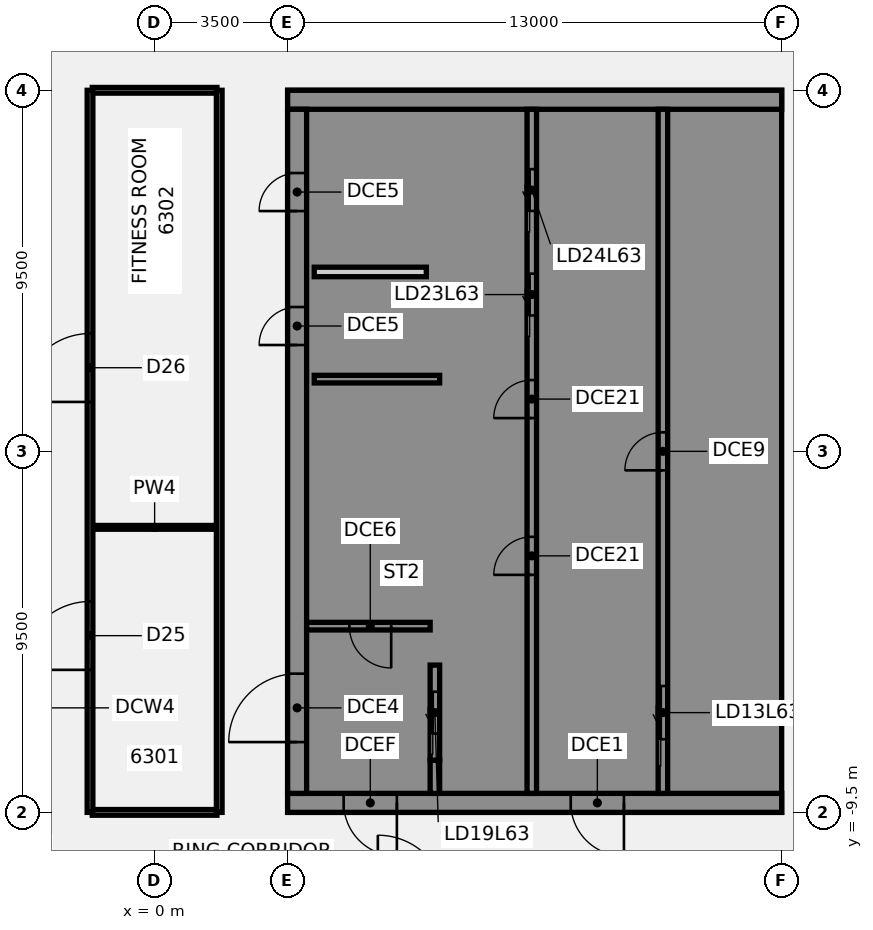
"""IFC4 building model, lengths in metres.
Left out: names, types, materials, properties, quantities, classifications, styles, units other than length and angle.
Written with IfcOpenShell. Run it as: python <this file> out.ifc"""

import sys

from ifc_helpers import new_model, si_unit, direction, frame, frame_2d, origin, place, context, subcontext, project, spatial, polyline, rectangle, outline, extrude, element, fill, save


model = new_model("IFC4")
c1 = context("Model", 3, precision=1e-05, world=origin(), true_north=direction((0.0, 1.0)))
c2 = subcontext(c1, "Body", "Model", "MODEL_VIEW")
j1 = project(units=[si_unit("LENGTHUNIT", "METRE"), si_unit("PLANEANGLEUNIT", "RADIAN")], contexts=[c1])
p1 = place(None, origin())
s1 = spatial("IfcSite", under=j1, at=p1, CompositionType="ELEMENT")
p2 = place(p1, origin())
s2 = spatial("IfcBuilding", under=s1, at=p2, CompositionType="ELEMENT")
p3 = place(p2, frame((0.0, 0.0, 248.7)))
s3 = spatial("IfcBuildingStorey", under=s2, at=p3, CompositionType="ELEMENT", Elevation=248.7)
p4 = place(p3, frame((-1.64, -9.5, 0.0), z_axis=(0.0, 0.0, 1.0), x_axis=(1.0, 0.0, 0.0)))
e1 = element("IfcWall", 1, at=p4, inside=s3, PredefinedType="PARTITIONING", context=c2, shape_type="SweptSolid", body=[
    extrude(rectangle(XDim=3.28, YDim=0.15, at=frame_2d((1.64, 0.0))), origin(), (0.0, 0.0, 1.0), 2.824),
])
p5 = place(p3, frame((-1.64, -2.0, 0.0), z_axis=(0.0, 0.0, 1.0), x_axis=(1.0, 0.0, 0.0)))
e2 = element("IfcWall", 2, at=p5, inside=s3, PredefinedType="PARTITIONING", context=c2, shape_type="SweptSolid", body=[
    extrude(rectangle(XDim=3.28, YDim=0.1, at=frame_2d((1.64, 0.0))), origin(), (0.0, 0.0, 1.0), 2.824),
])
p6 = place(p3, frame((-1.64, 9.5, 0.0), z_axis=(0.0, 0.0, 1.0), x_axis=(1.0, 0.0, 0.0)))
e3 = element("IfcWall", 3, at=p6, inside=s3, PredefinedType="PARTITIONING", context=c2, shape_type="SweptSolid", body=[
    extrude(rectangle(XDim=3.28, YDim=0.15, at=frame_2d((1.64, 0.0))), origin(), (0.0, 0.0, 1.0), 2.824),
])
p7 = place(p3, frame((-1.7, -9.5, 0.0), z_axis=(0.0, 0.0, 1.0), x_axis=(0.0, 1.0, 0.0)))
e4 = element("IfcWall", 4, at=p7, inside=s3, PredefinedType="PARTITIONING", context=c2, shape_type="SweptSolid", body=[
    extrude(rectangle(XDim=19.0, YDim=0.15, at=frame_2d((9.5, 0.0))), origin(), (0.0, 0.0, 1.0), 2.824),
])
p8 = place(p7, frame((3.75, 0.0, 0.0)))
e5 = element("IfcOpeningElement", 5, at=p8, cuts=e4, PredefinedType="OPENING", context=c2, shape_type="SweptSolid", body=[
    extrude(rectangle(XDim=1.8, YDim=2.1, at=frame_2d((0.9, 1.05))), frame((0.0, 0.085, 0.0), z_axis=(0.0, -1.0, 0.0), x_axis=(1.0, 0.0, 0.0)), (0.0, 0.0, 1.0), 0.17),
])
p9 = place(p7, frame((10.8, 0.0, 0.0)))
e6 = element("IfcOpeningElement", 6, at=p9, cuts=e4, PredefinedType="OPENING", context=c2, shape_type="SweptSolid", body=[
    extrude(rectangle(XDim=1.8, YDim=2.1, at=frame_2d((0.9, 1.05))), frame((0.0, 0.085, 0.0), z_axis=(0.0, -1.0, 0.0), x_axis=(1.0, 0.0, 0.0)), (0.0, 0.0, 1.0), 0.17),
])
p10 = place(p3, frame((1.7, -9.5, 0.0), z_axis=(0.0, 0.0, 1.0), x_axis=(0.0, 1.0, 0.0)))
e7 = element("IfcWall", 7, at=p10, inside=s3, PredefinedType="PARTITIONING", context=c2, shape_type="SweptSolid", body=[
    extrude(rectangle(XDim=19.0, YDim=0.15, at=frame_2d((9.5, 0.0))), origin(), (0.0, 0.0, 1.0), 2.824),
])
p11 = place(p3, frame((16.5, -9.25, 0.0), z_axis=(0.0, 0.0, 1.0), x_axis=(-1.0, 0.0, 0.0)))
e8 = element("IfcWall", 8, at=p11, inside=s3, PredefinedType="SHEAR", context=c2, shape_type="SweptSolid", body=[
    extrude(rectangle(XDim=13.0, YDim=0.5, at=frame_2d((6.5, 0.0))), origin(), (0.0, 0.0, 1.0), 3.42),
])
p12 = place(p11, frame((4.15, 0.0, 0.0)))
e9 = element("IfcOpeningElement", 9, at=p12, cuts=e8, PredefinedType="OPENING", context=c2, shape_type="SweptSolid", body=[
    extrude(rectangle(XDim=1.4, YDim=2.1, at=frame_2d((0.7, 1.05))), frame((0.0, 0.26, 0.0), z_axis=(0.0, -1.0, 0.0), x_axis=(1.0, 0.0, 0.0)), (0.0, 0.0, 1.0), 0.52),
])
p13 = place(p11, frame((10.125, 0.0, 0.0)))
e10 = element("IfcOpeningElement", 10, at=p13, cuts=e8, PredefinedType="OPENING", context=c2, shape_type="SweptSolid", body=[
    extrude(rectangle(XDim=1.4, YDim=2.1, at=frame_2d((0.7, 1.05))), frame((0.0, 0.26, 0.0), z_axis=(0.0, -1.0, 0.0), x_axis=(1.0, 0.0, 0.0)), (0.0, 0.0, 1.0), 0.52),
])
p14 = place(p3, origin())
e11 = element("IfcWall", 11, at=p14, inside=s3, PredefinedType="SHEAR", context=c2, shape_type="SweptSolid", body=[
    extrude(outline(polyline([(13.5, -8.125), (13.5, -9.0), (16.0, -9.0), (16.5, -9.0), (16.5, 9.0), (16.0, 9.0), (13.5, 9.0), (13.5, 8.125), (16.0, 8.125), (16.0, 5.625), (13.5, 5.625), (13.5, 5.375), (16.0, 5.375), (16.0, -5.375), (13.5, -5.375), (13.5, -5.625), (16.0, -5.625), (16.0, -8.125), (13.5, -8.125)])), origin(), (0.0, 0.0, 1.0), 3.42),
])
p15 = place(p3, frame((16.5, 9.25, 0.0), z_axis=(0.0, 0.0, 1.0), x_axis=(-1.0, 0.0, 0.0)))
e12 = element("IfcWall", 12, at=p15, inside=s3, PredefinedType="SHEAR", context=c2, shape_type="SweptSolid", body=[
    extrude(rectangle(XDim=13.0, YDim=0.5, at=frame_2d((6.5, 0.0))), origin(), (0.0, 0.0, 1.0), 3.42),
])
p16 = place(p3, origin())
e13 = element("IfcWall", 13, at=p16, inside=s3, PredefinedType="SHEAR", context=c2, shape_type="SweptSolid", body=[
    extrude(outline(polyline([(9.8, -5.375), (7.5, -5.375), (7.5, 2.625), (9.8, 2.625), (9.8, 2.875), (7.5, 2.875), (7.5, 5.375), (9.8, 5.375), (9.8, 5.625), (7.5, 5.625), (7.5, 8.125), (9.8, 8.125), (9.8, 9.0), (7.5, 9.0), (7.25, 9.0), (7.25, -5.625), (7.5, -5.625), (9.8, -5.625), (9.8, -5.375)])), origin(), (0.0, 0.0, 1.0), 3.42),
])
p17 = place(p3, origin())
e14 = element("IfcWall", 14, at=p17, inside=s3, PredefinedType="SHEAR", context=c2, shape_type="SweptSolid", body=[
    extrude(outline(polyline([(7.5, -8.125), (7.5, -9.0), (9.8, -9.0), (9.8, -8.125), (9.8, -5.625), (9.55, -5.625), (9.55, -8.125), (7.5, -8.125)])), origin(), (0.0, 0.0, 1.0), 3.42),
])
p18 = place(p3, frame((7.375, -9.0, 0.0), z_axis=(0.0, 0.0, 1.0), x_axis=(0.0, 1.0, 0.0)))
e15 = element("IfcWall", 15, at=p18, inside=s3, PredefinedType="SHEAR", context=c2, shape_type="SweptSolid", body=[
    extrude(rectangle(XDim=0.875, YDim=0.25, at=frame_2d((0.438, 0.0))), origin(), (0.0, 0.0, 1.0), 3.42),
])
p19 = place(p3, frame((7.5, 1.9, 0.0), z_axis=(0.0, 0.0, 1.0), x_axis=(-1.0, 0.0, 0.0)))
e16 = element("IfcWall", 16, at=p19, inside=s3, PredefinedType="SHEAR", context=c2, shape_type="SweptSolid", body=[
    extrude(rectangle(XDim=3.3, YDim=0.2, at=frame_2d((1.65, 0.0))), origin(), (0.0, 0.0, 1.0), 3.42),
])
p20 = place(p3, frame((13.375, -9.0, 0.0), z_axis=(0.0, 0.0, 1.0), x_axis=(0.0, 1.0, 0.0)))
e17 = element("IfcWall", 17, at=p20, inside=s3, PredefinedType="SHEAR", context=c2, shape_type="SweptSolid", body=[
    extrude(rectangle(XDim=18.0, YDim=0.25, at=frame_2d((9.0, 0.0))), origin(), (0.0, 0.0, 1.0), 3.42),
])
p21 = place(p20, frame((1.425, 0.0, 0.0)))
e18 = element("IfcOpeningElement", 18, at=p21, cuts=e17, PredefinedType="OPENING", context=c2, shape_type="SweptSolid", body=[
    extrude(rectangle(XDim=1.4, YDim=2.1, at=frame_2d((0.7, 1.05))), frame((0.0, 0.135, 0.0), z_axis=(0.0, -1.0, 0.0), x_axis=(1.0, 0.0, 0.0)), (0.0, 0.0, 1.0), 0.27),
])
p22 = place(p20, frame((8.5, 0.0, 0.0)))
e19 = element("IfcOpeningElement", 19, at=p22, cuts=e17, PredefinedType="OPENING", context=c2, shape_type="SweptSolid", body=[
    extrude(rectangle(XDim=1.0, YDim=2.1, at=frame_2d((0.5, 1.05))), frame((0.0, 0.135, 0.0), z_axis=(0.0, -1.0, 0.0), x_axis=(1.0, 0.0, 0.0)), (0.0, 0.0, 1.0), 0.27),
])
p23 = place(p3, frame((9.925, -9.0, 0.0), z_axis=(0.0, 0.0, 1.0), x_axis=(0.0, 1.0, 0.0)))
e20 = element("IfcWall", 20, at=p23, inside=s3, PredefinedType="SHEAR", context=c2, shape_type="SweptSolid", body=[
    extrude(rectangle(XDim=18.0, YDim=0.25, at=frame_2d((9.0, 0.0))), origin(), (0.0, 0.0, 1.0), 3.42),
])
p24 = place(p23, frame((12.575, 0.0, 0.0)))
e21 = element("IfcOpeningElement", 21, at=p24, cuts=e20, PredefinedType="OPENING", context=c2, shape_type="SweptSolid", body=[
    extrude(rectangle(XDim=1.1, YDim=2.1, at=frame_2d((0.55, 1.05))), frame((0.0, 0.135, 0.0), z_axis=(0.0, -1.0, 0.0), x_axis=(1.0, 0.0, 0.0)), (0.0, 0.0, 1.0), 0.27),
])
p25 = place(p23, frame((15.325, 0.0, 0.0)))
e22 = element("IfcOpeningElement", 22, at=p25, cuts=e20, PredefinedType="OPENING", context=c2, shape_type="SweptSolid", body=[
    extrude(rectangle(XDim=1.1, YDim=2.1, at=frame_2d((0.55, 1.05))), frame((0.0, 0.135, 0.0), z_axis=(0.0, -1.0, 0.0), x_axis=(1.0, 0.0, 0.0)), (0.0, 0.0, 1.0), 0.27),
])
p26 = place(p23, frame((5.75, 0.0, 0.0)))
e23 = element("IfcOpeningElement", 23, at=p26, cuts=e20, PredefinedType="OPENING", context=c2, shape_type="SweptSolid", body=[
    extrude(rectangle(XDim=1.0, YDim=2.1, at=frame_2d((0.5, 1.05))), frame((0.0, 0.135, 0.0), z_axis=(0.0, -1.0, 0.0), x_axis=(1.0, 0.0, 0.0)), (0.0, 0.0, 1.0), 0.27),
])
p27 = place(p23, frame((9.875, 0.0, 0.0)))
e24 = element("IfcOpeningElement", 24, at=p27, cuts=e20, PredefinedType="OPENING", context=c2, shape_type="SweptSolid", body=[
    extrude(rectangle(XDim=1.0, YDim=2.1, at=frame_2d((0.5, 1.05))), frame((0.0, 0.135, 0.0), z_axis=(0.0, -1.0, 0.0), x_axis=(1.0, 0.0, 0.0)), (0.0, 0.0, 1.0), 0.27),
])
p28 = place(p3, frame((7.375, -8.125, 0.0), z_axis=(0.0, 0.0, 1.0), x_axis=(0.0, 1.0, 0.0)))
e25 = element("IfcWall", 25, at=p28, inside=s3, PredefinedType="SHEAR", context=c2, shape_type="SweptSolid", body=[
    extrude(rectangle(XDim=2.5, YDim=0.25, at=frame_2d((1.25, 0.0))), origin(), (0.0, 0.0, 1.0), 3.42),
])
p29 = place(p28, frame((0.7, 0.0, 0.0)))
e26 = element("IfcOpeningElement", 26, at=p29, cuts=e25, PredefinedType="OPENING", context=c2, shape_type="SweptSolid", body=[
    extrude(rectangle(XDim=1.1, YDim=2.1, at=frame_2d((0.55, 1.05))), frame((0.0, 0.135, 0.0), z_axis=(0.0, -1.0, 0.0), x_axis=(1.0, 0.0, 0.0)), (0.0, 0.0, 1.0), 0.27),
])
p30 = place(p3, frame((3.75, -9.0, 0.0), z_axis=(0.0, 0.0, 1.0), x_axis=(0.0, 1.0, 0.0)))
e27 = element("IfcWall", 27, at=p30, inside=s3, PredefinedType="SHEAR", context=c2, shape_type="SweptSolid", body=[
    extrude(rectangle(XDim=18.0, YDim=0.5, at=frame_2d((9.0, 0.0))), origin(), (0.0, 0.0, 1.0), 3.42),
])
p31 = place(p30, frame((1.35, 0.0, 0.0)))
e28 = element("IfcOpeningElement", 28, at=p31, cuts=e27, PredefinedType="OPENING", context=c2, shape_type="SweptSolid", body=[
    extrude(rectangle(XDim=1.8, YDim=2.1, at=frame_2d((0.9, 1.05))), frame((0.0, 0.26, 0.0), z_axis=(0.0, -1.0, 0.0), x_axis=(1.0, 0.0, 0.0)), (0.0, 0.0, 1.0), 0.52),
])
p32 = place(p30, frame((11.798, 0.0, 0.0)))
e29 = element("IfcOpeningElement", 29, at=p32, cuts=e27, PredefinedType="OPENING", context=c2, shape_type="SweptSolid", body=[
    extrude(rectangle(XDim=1.0, YDim=2.1, at=frame_2d((0.5, 1.05))), frame((0.0, 0.26, 0.0), z_axis=(0.0, -1.0, 0.0), x_axis=(1.0, 0.0, 0.0)), (0.0, 0.0, 1.0), 0.52),
])
p33 = place(p30, frame((15.323, 0.0, 0.0)))
e30 = element("IfcOpeningElement", 30, at=p33, cuts=e27, PredefinedType="OPENING", context=c2, shape_type="SweptSolid", body=[
    extrude(rectangle(XDim=1.0, YDim=2.1, at=frame_2d((0.5, 1.05))), frame((0.0, 0.26, 0.0), z_axis=(0.0, -1.0, 0.0), x_axis=(1.0, 0.0, 0.0)), (0.0, 0.0, 1.0), 0.52),
])
p34 = place(p3, frame((7.15, 4.72, 0.0), z_axis=(0.0, 0.0, 1.0), x_axis=(-1.0, 0.0, 0.0)))
e31 = element("IfcWall", 31, at=p34, inside=s3, PredefinedType="PARTITIONING", context=c2, shape_type="SweptSolid", body=[
    extrude(rectangle(XDim=2.95, YDim=0.25, at=frame_2d((1.475, 0.0))), origin(), (0.0, 0.0, 1.0), 3.42),
])
p35 = place(p3, frame((7.25, -4.6, 0.0), z_axis=(0.0, 0.0, 1.0), x_axis=(-1.0, 0.0, 0.0)))
e32 = element("IfcWall", 32, at=p35, inside=s3, PredefinedType="SHEAR", context=c2, shape_type="SweptSolid", body=[
    extrude(rectangle(XDim=3.25, YDim=0.2, at=frame_2d((1.625, 0.0))), origin(), (0.0, 0.0, 1.0), 3.42),
])
p36 = place(p35, frame((1.025, 0.0, 0.0)))
e33 = element("IfcOpeningElement", 33, at=p36, cuts=e32, PredefinedType="OPENING", context=c2, shape_type="SweptSolid", body=[
    extrude(rectangle(XDim=1.1, YDim=2.1, at=frame_2d((0.55, 1.05))), frame((0.0, 0.11, 0.0), z_axis=(0.0, -1.0, 0.0), x_axis=(1.0, 0.0, 0.0)), (0.0, 0.0, 1.0), 0.22),
])
p37 = place(p8, frame((1.8, 0.0, 0.0), z_axis=(0.0, 0.0, 1.0), x_axis=(-1.0, 0.0, 0.0)))
e34 = element("IfcDoor", 34, at=p37, inside=s3, OperationType="DOUBLE_DOOR_SINGLE_SWING", PredefinedType="DOOR", context=c2, shape_type="SweptSolid", body=[
    extrude(rectangle(XDim=1.8, YDim=2.1, at=frame_2d((0.9, 1.05))), frame((0.0, 0.025, 0.0), z_axis=(0.0, -1.0, 0.0), x_axis=(1.0, 0.0, 0.0)), (0.0, 0.0, 1.0), 0.05),
])
fill(e5, e34)
p38 = place(p9, frame((1.8, 0.0, 0.0), z_axis=(0.0, 0.0, 1.0), x_axis=(-1.0, 0.0, 0.0)))
e35 = element("IfcDoor", 35, at=p38, inside=s3, OperationType="DOUBLE_DOOR_SINGLE_SWING", PredefinedType="DOOR", context=c2, shape_type="SweptSolid", body=[
    extrude(rectangle(XDim=1.8, YDim=2.1, at=frame_2d((0.9, 1.05))), frame((0.0, 0.025, 0.0), z_axis=(0.0, -1.0, 0.0), x_axis=(1.0, 0.0, 0.0)), (0.0, 0.0, 1.0), 0.05),
])
fill(e6, e35)
p39 = place(p12, origin())
e36 = element("IfcDoor", 36, at=p39, inside=s3, OperationType="SINGLE_SWING_LEFT", PredefinedType="DOOR", context=c2, shape_type="SweptSolid", body=[
    extrude(rectangle(XDim=1.4, YDim=2.1, at=frame_2d((0.7, 1.05))), frame((0.0, 0.025, 0.0), z_axis=(0.0, -1.0, 0.0), x_axis=(1.0, 0.0, 0.0)), (0.0, 0.0, 1.0), 0.05),
])
fill(e9, e36)
p40 = place(p13, origin())
e37 = element("IfcDoor", 37, at=p40, inside=s3, OperationType="SINGLE_SWING_LEFT", PredefinedType="DOOR", context=c2, shape_type="SweptSolid", body=[
    extrude(rectangle(XDim=1.4, YDim=2.1, at=frame_2d((0.7, 1.05))), frame((0.0, 0.025, 0.0), z_axis=(0.0, -1.0, 0.0), x_axis=(1.0, 0.0, 0.0)), (0.0, 0.0, 1.0), 0.05),
])
fill(e10, e37)
p41 = place(p31, origin())
e38 = element("IfcDoor", 38, at=p41, inside=s3, OperationType="SINGLE_SWING_LEFT", PredefinedType="DOOR", context=c2, shape_type="SweptSolid", body=[
    extrude(rectangle(XDim=1.8, YDim=2.1, at=frame_2d((0.9, 1.05))), frame((0.0, 0.025, 0.0), z_axis=(0.0, -1.0, 0.0), x_axis=(1.0, 0.0, 0.0)), (0.0, 0.0, 1.0), 0.05),
])
fill(e28, e38)
p42 = place(p32, origin())
e39 = element("IfcDoor", 39, at=p42, inside=s3, OperationType="SINGLE_SWING_LEFT", PredefinedType="DOOR", context=c2, shape_type="SweptSolid", body=[
    extrude(rectangle(XDim=1.0, YDim=2.1, at=frame_2d((0.5, 1.05))), frame((0.0, -0.175, 0.0), z_axis=(0.0, -1.0, 0.0), x_axis=(1.0, 0.0, 0.0)), (0.0, 0.0, 1.0), 0.05),
])
fill(e29, e39)
p43 = place(p33, origin())
e40 = element("IfcDoor", 40, at=p43, inside=s3, OperationType="SINGLE_SWING_LEFT", PredefinedType="DOOR", context=c2, shape_type="SweptSolid", body=[
    extrude(rectangle(XDim=1.0, YDim=2.1, at=frame_2d((0.5, 1.05))), frame((0.0, -0.175, 0.0), z_axis=(0.0, -1.0, 0.0), x_axis=(1.0, 0.0, 0.0)), (0.0, 0.0, 1.0), 0.05),
])
fill(e30, e40)
p44 = place(p36, origin())
e41 = element("IfcDoor", 41, at=p44, inside=s3, OperationType="SINGLE_SWING_LEFT", PredefinedType="DOOR", context=c2, shape_type="SweptSolid", body=[
    extrude(rectangle(XDim=1.1, YDim=2.1, at=frame_2d((0.55, 1.05))), frame((0.0, 0.025, 0.0), z_axis=(0.0, -1.0, 0.0), x_axis=(1.0, 0.0, 0.0)), (0.0, 0.0, 1.0), 0.05),
])
fill(e33, e41)
p45 = place(p21, origin())
e42 = element("IfcDoor", 42, at=p45, inside=s3, OperationType="SLIDING_TO_LEFT", PredefinedType="DOOR", context=c2, shape_type="SweptSolid", body=[
    extrude(rectangle(XDim=1.4, YDim=2.1, at=frame_2d((0.7, 1.05))), frame((0.0, 0.025, 0.0), z_axis=(0.0, -1.0, 0.0), x_axis=(1.0, 0.0, 0.0)), (0.0, 0.0, 1.0), 0.05),
])
fill(e18, e42)
p46 = place(p29, origin())
e43 = element("IfcDoor", 43, at=p46, inside=s3, OperationType="SLIDING_TO_LEFT", PredefinedType="DOOR", context=c2, shape_type="SweptSolid", body=[
    extrude(rectangle(XDim=1.1, YDim=2.1, at=frame_2d((0.55, 1.05))), frame((0.0, 0.025, 0.0), z_axis=(0.0, -1.0, 0.0), x_axis=(1.0, 0.0, 0.0)), (0.0, 0.0, 1.0), 0.05),
])
fill(e26, e43)
p47 = place(p24, origin())
e44 = element("IfcDoor", 44, at=p47, inside=s3, OperationType="SLIDING_TO_LEFT", PredefinedType="DOOR", context=c2, shape_type="SweptSolid", body=[
    extrude(rectangle(XDim=1.1, YDim=2.1, at=frame_2d((0.55, 1.05))), frame((0.0, 0.025, 0.0), z_axis=(0.0, -1.0, 0.0), x_axis=(1.0, 0.0, 0.0)), (0.0, 0.0, 1.0), 0.05),
])
fill(e21, e44)
p48 = place(p25, origin())
e45 = element("IfcDoor", 45, at=p48, inside=s3, OperationType="SLIDING_TO_LEFT", PredefinedType="DOOR", context=c2, shape_type="SweptSolid", body=[
    extrude(rectangle(XDim=1.1, YDim=2.1, at=frame_2d((0.55, 1.05))), frame((0.0, 0.025, 0.0), z_axis=(0.0, -1.0, 0.0), x_axis=(1.0, 0.0, 0.0)), (0.0, 0.0, 1.0), 0.05),
])
fill(e22, e45)
p49 = place(p22, origin())
e46 = element("IfcDoor", 46, at=p49, inside=s3, OperationType="SINGLE_SWING_LEFT", PredefinedType="DOOR", context=c2, shape_type="SweptSolid", body=[
    extrude(rectangle(XDim=1.0, YDim=2.1, at=frame_2d((0.5, 1.05))), frame((0.0, 0.025, 0.0), z_axis=(0.0, -1.0, 0.0), x_axis=(1.0, 0.0, 0.0)), (0.0, 0.0, 1.0), 0.05),
])
fill(e19, e46)
p50 = place(p26, origin())
e47 = element("IfcDoor", 47, at=p50, inside=s3, OperationType="SINGLE_SWING_LEFT", PredefinedType="DOOR", context=c2, shape_type="SweptSolid", body=[
    extrude(rectangle(XDim=1.0, YDim=2.1, at=frame_2d((0.5, 1.05))), frame((0.0, 0.025, 0.0), z_axis=(0.0, -1.0, 0.0), x_axis=(1.0, 0.0, 0.0)), (0.0, 0.0, 1.0), 0.05),
])
fill(e23, e47)
p51 = place(p27, origin())
e48 = element("IfcDoor", 48, at=p51, inside=s3, OperationType="SINGLE_SWING_LEFT", PredefinedType="DOOR", context=c2, shape_type="SweptSolid", body=[
    extrude(rectangle(XDim=1.0, YDim=2.1, at=frame_2d((0.5, 1.05))), frame((0.0, 0.025, 0.0), z_axis=(0.0, -1.0, 0.0), x_axis=(1.0, 0.0, 0.0)), (0.0, 0.0, 1.0), 0.05),
])
fill(e24, e48)
save(model, sys.argv[1])
